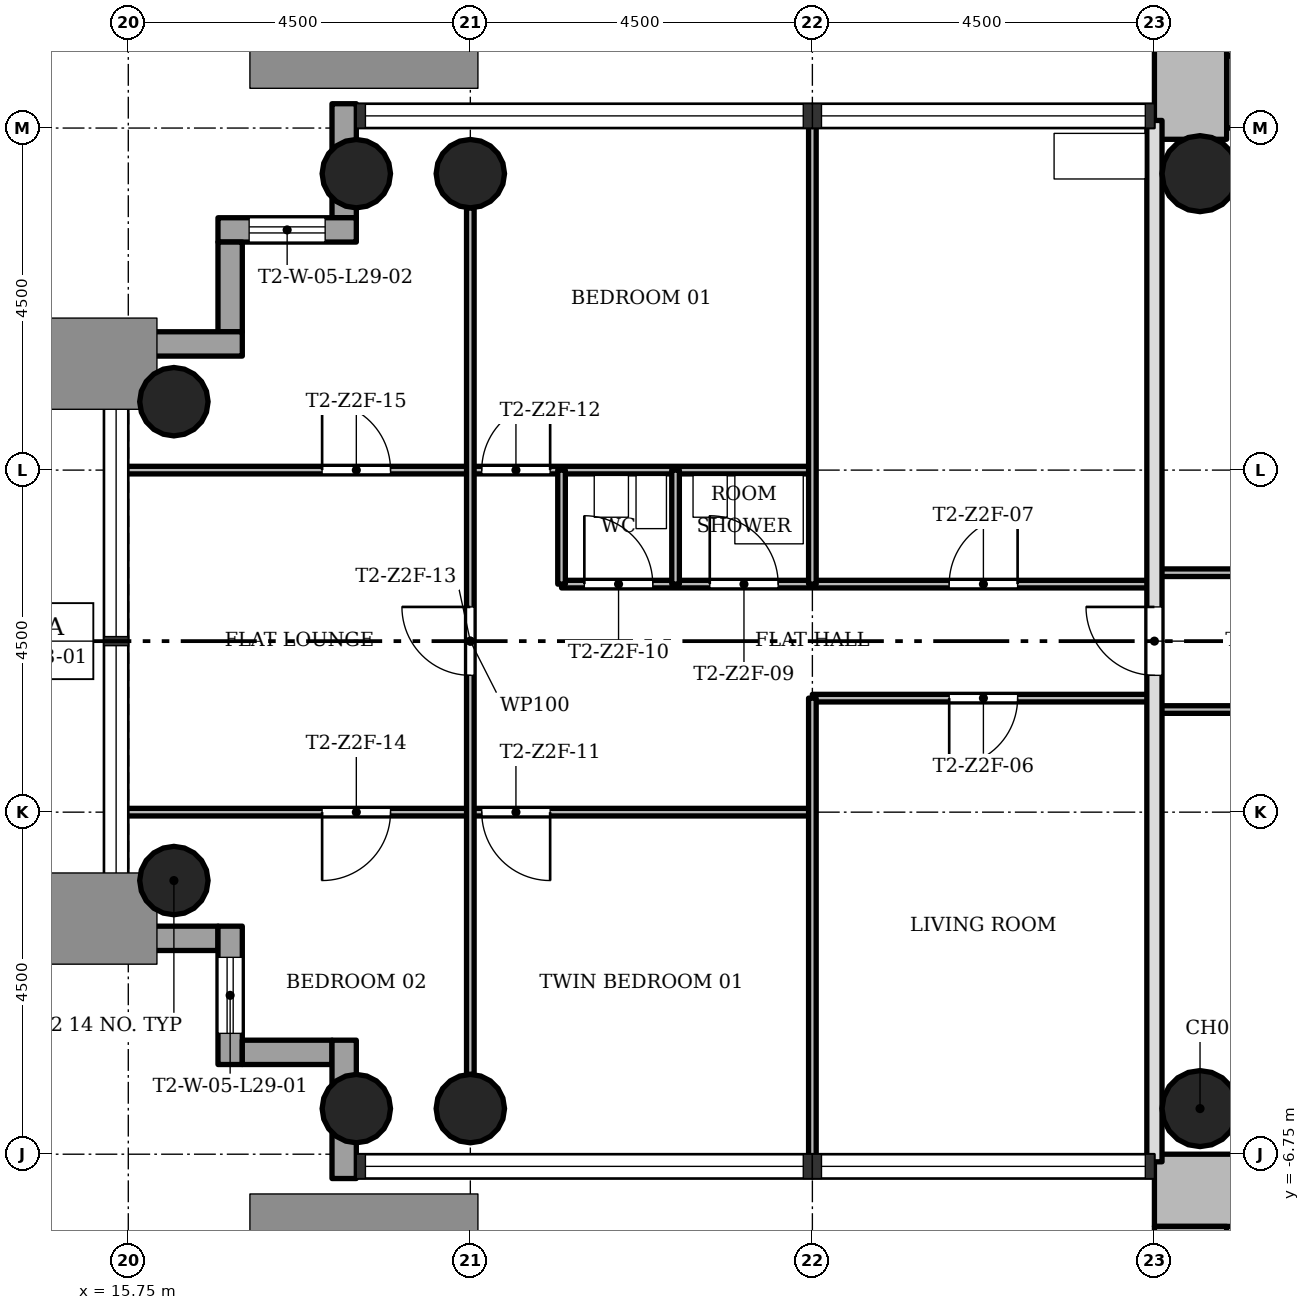
"""IFC4 building model, lengths in metres.
Left out: names, types, materials, properties, quantities, classifications, styles, units other than length and angle.
Written with IfcOpenShell. Run it as: python <this file> out.ifc"""

import sys

from ifc_helpers import new_model, si_unit, direction, frame, frame_2d, origin, origin_2d, place, context, subcontext, project, spatial, rectangle, hollow_circle, extrude, element, fill, save


model = new_model("IFC4")
c1 = context("Model", 3, precision=1e-05, world=origin(), true_north=direction((0.0, 1.0)))
c2 = subcontext(c1, "Body", "Model", "MODEL_VIEW")
j1 = project(units=[si_unit("LENGTHUNIT", "METRE"), si_unit("PLANEANGLEUNIT", "RADIAN")], contexts=[c1])
p1 = place(None, origin())
s1 = spatial("IfcSite", under=j1, at=p1, CompositionType="ELEMENT")
p2 = place(p1, origin())
s2 = spatial("IfcBuilding", under=s1, at=p2, CompositionType="ELEMENT")
p3 = place(p2, frame((0.0, 0.0, 107.2)))
s3 = spatial("IfcBuildingStorey", under=s2, at=p3, CompositionType="ELEMENT", Elevation=107.2)
p4 = place(p3, frame((30.2, 7.225, 0.0), z_axis=(0.0, 0.0, 1.0), x_axis=(1.0, 0.0, 0.0)))
e1 = element("IfcWall", 1, at=p4, inside=s3, PredefinedType="SHEAR", context=c2, shape_type="SweptSolid", body=[
    extrude(rectangle(XDim=12.55, YDim=0.95, at=frame_2d((6.275, 0.0))), origin(), (0.0, 0.0, 1.0), 3.4),
])
p5 = place(p4, frame((4.9, 0.0, 0.0)))
e2 = element("IfcOpeningElement", 2, at=p5, cuts=e1, PredefinedType="OPENING", context=c2, shape_type="SweptSolid", body=[
    extrude(rectangle(XDim=1.8, YDim=2.1, at=frame_2d((0.9, 1.05))), frame((0.0, 0.485, 0.0), z_axis=(0.0, -1.0, 0.0), x_axis=(1.0, 0.0, 0.0)), (0.0, 0.0, 1.0), 0.97),
])
p6 = place(p3, frame((29.725, 15.298, 0.0), z_axis=(0.0, 0.0, 1.0), x_axis=(0.0, -1.0, 0.0)))
e3 = element("IfcWall", 3, at=p6, inside=s3, PredefinedType="SHEAR", context=c2, shape_type="SweptSolid", body=[
    extrude(rectangle(XDim=8.696, YDim=0.95, at=frame_2d((4.348, 0.0))), origin(), (0.0, 0.0, 1.0), 3.4),
])
p7 = place(p3, frame((41.8, -7.225, 0.0), z_axis=(0.0, 0.0, 1.0), x_axis=(-1.0, 0.0, 0.0)))
e4 = element("IfcWall", 4, at=p7, inside=s3, PredefinedType="SHEAR", context=c2, shape_type="SweptSolid", body=[
    extrude(rectangle(XDim=12.55, YDim=0.95, at=frame_2d((6.275, 0.0))), origin(), (0.0, 0.0, 1.0), 3.4),
])
p8 = place(p7, frame((4.9, 0.0, 0.0)))
e5 = element("IfcOpeningElement", 5, at=p8, cuts=e4, PredefinedType="OPENING", context=c2, shape_type="SweptSolid", body=[
    extrude(rectangle(XDim=1.8, YDim=2.1, at=frame_2d((0.9, 1.05))), frame((0.0, 0.485, 0.0), z_axis=(0.0, -1.0, 0.0), x_axis=(1.0, 0.0, 0.0)), (0.0, 0.0, 1.0), 0.97),
])
p9 = place(p3, frame((29.725, -7.7, 0.0), z_axis=(0.0, 0.0, 1.0), x_axis=(0.0, -1.0, 0.0)))
e6 = element("IfcWall", 6, at=p9, inside=s3, PredefinedType="SHEAR", context=c2, shape_type="SweptSolid", body=[
    extrude(rectangle(XDim=8.05, YDim=0.95, at=frame_2d((4.025, 0.0))), origin(), (0.0, 0.0, 1.0), 3.4),
])
for number, where, z_axis, x_axis in (
    (7, (20.25, 6.15, 0.0), (0.0, 0.0, 1.0), (1.0, 0.0, 0.0)),
    (8, (20.25, -6.15, 0.0), (0.0, 0.0, 1.0), (1.0, 0.0, 0.0)),
    (9, (18.75, 6.15, 0.0), (0.0, 0.0, 1.0), (1.0, 0.0, 0.0)),
    (10, (18.75, -6.15, 0.0), (0.0, 0.0, 1.0), (1.0, 0.0, 0.0)),
    (11, (16.35, 3.15, 0.0), (0.0, 0.0, 1.0), (1.0, 0.0, 0.0)),
    (12, (16.35, -3.15, 0.0), (0.0, 0.0, 1.0), (1.0, 0.0, 0.0)),
):
    element("IfcColumn", number, at=place(p3, frame(where, z_axis=z_axis, x_axis=x_axis)), inside=s3, PredefinedType="COLUMN", context=c2, shape_type="SweptSolid", body=[
        extrude(hollow_circle(Radius=0.45, WallThickness=0.032, at=origin_2d()), origin(), (0.0, 0.0, 1.0), 3.4),
    ])
for number, where, z_axis, x_axis in (
    (13, (29.85, 6.15, 0.0), (0.0, 0.0, 1.0), (1.0, 0.0, 0.0)),
    (14, (29.85, -6.15, 0.0), (0.0, 0.0, 1.0), (1.0, 0.0, 0.0)),
):
    element("IfcColumn", number, at=place(p3, frame(where, z_axis=z_axis, x_axis=x_axis)), inside=s3, PredefinedType="COLUMN", context=c2, shape_type="SweptSolid", body=[
        extrude(hollow_circle(Radius=0.5, WallThickness=0.036, at=origin_2d()), origin(), (0.0, 0.0, 1.0), 3.4),
    ])
p10 = place(p3, frame((18.59, 7.07, -0.3), z_axis=(0.0, 0.0, 1.0), x_axis=(0.0, -1.0, 0.0)))
e15 = element("IfcWall", 15, at=p10, inside=s3, PredefinedType="STANDARD", context=c2, shape_type="SweptSolid", body=[
    extrude(rectangle(XDim=1.5, YDim=0.32, at=frame_2d((0.75, 0.0))), origin(), (0.0, 0.0, 1.0), 3.4),
])
p11 = place(p3, frame((18.75, 5.41, -0.3), z_axis=(0.0, 0.0, 1.0), x_axis=(-1.0, 0.0, 0.0)))
e16 = element("IfcWall", 16, at=p11, inside=s3, PredefinedType="STANDARD", context=c2, shape_type="SweptSolid", body=[
    extrude(rectangle(XDim=1.82, YDim=0.32, at=frame_2d((0.91, 0.0))), origin(), (0.0, 0.0, 1.0), 3.4),
])
p12 = place(p11, frame((0.41, 0.0, 1.2)))
e17 = element("IfcOpeningElement", 17, at=p12, cuts=e16, PredefinedType="OPENING", context=c2, shape_type="SweptSolid", body=[
    extrude(rectangle(XDim=1.0, YDim=1.5, at=frame_2d((0.5, 0.75))), frame((0.0, 0.17, 0.0), z_axis=(0.0, -1.0, 0.0), x_axis=(1.0, 0.0, 0.0)), (0.0, 0.0, 1.0), 0.34),
])
p13 = place(p3, frame((17.09, 5.25, -0.3), z_axis=(0.0, 0.0, 1.0), x_axis=(0.0, -1.0, 0.0)))
e18 = element("IfcWall", 18, at=p13, inside=s3, PredefinedType="STANDARD", context=c2, shape_type="SweptSolid", body=[
    extrude(rectangle(XDim=1.18, YDim=0.32, at=frame_2d((0.59, 0.0))), origin(), (0.0, 0.0, 1.0), 3.4),
])
p14 = place(p3, frame((17.25, 3.91, -0.3), z_axis=(0.0, 0.0, 1.0), x_axis=(-1.0, 0.0, 0.0)))
e19 = element("IfcWall", 19, at=p14, inside=s3, PredefinedType="STANDARD", context=c2, shape_type="SweptSolid", body=[
    extrude(rectangle(XDim=1.82, YDim=0.32, at=frame_2d((0.91, 0.0))), origin(), (0.0, 0.0, 1.0), 3.4),
])
p15 = place(p3, frame((15.43, -3.91, -0.3), z_axis=(0.0, 0.0, 1.0), x_axis=(1.0, 0.0, 0.0)))
e20 = element("IfcWall", 20, at=p15, inside=s3, PredefinedType="STANDARD", context=c2, shape_type="SweptSolid", body=[
    extrude(rectangle(XDim=1.5, YDim=0.32, at=frame_2d((0.75, 0.0))), origin(), (0.0, 0.0, 1.0), 3.4),
])
p16 = place(p3, frame((17.09, -3.75, -0.3), z_axis=(0.0, 0.0, 1.0), x_axis=(0.0, -1.0, 0.0)))
e21 = element("IfcWall", 21, at=p16, inside=s3, PredefinedType="STANDARD", context=c2, shape_type="SweptSolid", body=[
    extrude(rectangle(XDim=1.82, YDim=0.32, at=frame_2d((0.91, 0.0))), origin(), (0.0, 0.0, 1.0), 3.4),
])
p17 = place(p16, frame((0.41, 0.0, 1.2)))
e22 = element("IfcOpeningElement", 22, at=p17, cuts=e21, PredefinedType="OPENING", context=c2, shape_type="SweptSolid", body=[
    extrude(rectangle(XDim=1.0, YDim=1.5, at=frame_2d((0.5, 0.75))), frame((0.0, 0.17, 0.0), z_axis=(0.0, -1.0, 0.0), x_axis=(1.0, 0.0, 0.0)), (0.0, 0.0, 1.0), 0.34),
])
p18 = place(p3, frame((17.25, -5.41, -0.3), z_axis=(0.0, 0.0, 1.0), x_axis=(1.0, 0.0, 0.0)))
e23 = element("IfcWall", 23, at=p18, inside=s3, PredefinedType="STANDARD", context=c2, shape_type="SweptSolid", body=[
    extrude(rectangle(XDim=1.18, YDim=0.32, at=frame_2d((0.59, 0.0))), origin(), (0.0, 0.0, 1.0), 3.4),
])
p19 = place(p3, frame((18.59, -5.25, -0.3), z_axis=(0.0, 0.0, 1.0), x_axis=(0.0, -1.0, 0.0)))
e24 = element("IfcWall", 24, at=p19, inside=s3, PredefinedType="STANDARD", context=c2, shape_type="SweptSolid", body=[
    extrude(rectangle(XDim=1.82, YDim=0.32, at=frame_2d((0.91, 0.0))), origin(), (0.0, 0.0, 1.0), 3.4),
])
p20 = place(p3, frame((24.75, -2.25, 0.0), z_axis=(0.0, 0.0, 1.0), x_axis=(-1.0, 0.0, 0.0)))
e25 = element("IfcWall", 25, at=p20, inside=s3, PredefinedType="PARTITIONING", context=c2, shape_type="SweptSolid", body=[
    extrude(rectangle(XDim=9.1, YDim=0.1, at=frame_2d((4.55, 0.0))), origin(), (0.0, 0.0, 1.0), 3.0),
])
p21 = place(p20, frame((3.45, 0.0, 0.0)))
e26 = element("IfcOpeningElement", 26, at=p21, cuts=e25, PredefinedType="OPENING", context=c2, shape_type="SweptSolid", body=[
    extrude(rectangle(XDim=0.9, YDim=2.1, at=frame_2d((0.45, 1.05))), frame((0.0, 0.06, 0.0), z_axis=(0.0, -1.0, 0.0), x_axis=(1.0, 0.0, 0.0)), (0.0, 0.0, 1.0), 0.12),
])
p22 = place(p20, frame((5.55, 0.0, 0.0)))
e27 = element("IfcOpeningElement", 27, at=p22, cuts=e25, PredefinedType="OPENING", context=c2, shape_type="SweptSolid", body=[
    extrude(rectangle(XDim=0.9, YDim=2.1, at=frame_2d((0.45, 1.05))), frame((0.0, 0.06, 0.0), z_axis=(0.0, -1.0, 0.0), x_axis=(1.0, 0.0, 0.0)), (0.0, 0.0, 1.0), 0.12),
])
p23 = place(p3, frame((34.5, -0.9, 0.0), z_axis=(0.0, 0.0, 1.0), x_axis=(-1.0, 0.0, 0.0)))
e28 = element("IfcWall", 28, at=p23, inside=s3, PredefinedType="PARTITIONING", context=c2, shape_type="SweptSolid", body=[
    extrude(rectangle(XDim=5.25, YDim=0.1, at=frame_2d((2.625, 0.0))), origin(), (0.0, 0.0, 1.0), 3.0),
])
p24 = place(p3, frame((29.25, -0.75, 0.0), z_axis=(0.0, 0.0, 1.0), x_axis=(-1.0, 0.0, 0.0)))
e29 = element("IfcWall", 29, at=p24, inside=s3, PredefinedType="PARTITIONING", context=c2, shape_type="SweptSolid", body=[
    extrude(rectangle(XDim=4.5, YDim=0.1, at=frame_2d((2.25, 0.0))), origin(), (0.0, 0.0, 1.0), 3.0),
])
p25 = place(p24, frame((1.8, 0.0, 0.0)))
e30 = element("IfcOpeningElement", 30, at=p25, cuts=e29, PredefinedType="OPENING", context=c2, shape_type="SweptSolid", body=[
    extrude(rectangle(XDim=0.9, YDim=2.1, at=frame_2d((0.45, 1.05))), frame((0.0, 0.06, 0.0), z_axis=(0.0, -1.0, 0.0), x_axis=(1.0, 0.0, 0.0)), (0.0, 0.0, 1.0), 0.12),
])
p26 = place(p3, frame((29.25, 0.75, 0.0), z_axis=(0.0, 0.0, 1.0), x_axis=(-1.0, 0.0, 0.0)))
e31 = element("IfcWall", 31, at=p26, inside=s3, PredefinedType="PARTITIONING", context=c2, shape_type="SweptSolid", body=[
    extrude(rectangle(XDim=7.8, YDim=0.1, at=frame_2d((3.9, 0.0))), origin(), (0.0, 0.0, 1.0), 3.0),
])
p27 = place(p26, frame((1.8, 0.0, 0.0)))
e32 = element("IfcOpeningElement", 32, at=p27, cuts=e31, PredefinedType="OPENING", context=c2, shape_type="SweptSolid", body=[
    extrude(rectangle(XDim=0.9, YDim=2.1, at=frame_2d((0.45, 1.05))), frame((0.0, 0.06, 0.0), z_axis=(0.0, -1.0, 0.0), x_axis=(1.0, 0.0, 0.0)), (0.0, 0.0, 1.0), 0.12),
])
p28 = place(p26, frame((4.95, 0.0, 0.0)))
e33 = element("IfcOpeningElement", 33, at=p28, cuts=e31, PredefinedType="OPENING", context=c2, shape_type="SweptSolid", body=[
    extrude(rectangle(XDim=0.9, YDim=2.1, at=frame_2d((0.45, 1.05))), frame((0.0, 0.06, 0.0), z_axis=(0.0, -1.0, 0.0), x_axis=(1.0, 0.0, 0.0)), (0.0, 0.0, 1.0), 0.12),
])
p29 = place(p26, frame((6.6, 0.0, 0.0)))
e34 = element("IfcOpeningElement", 34, at=p29, cuts=e31, PredefinedType="OPENING", context=c2, shape_type="SweptSolid", body=[
    extrude(rectangle(XDim=0.9, YDim=2.1, at=frame_2d((0.45, 1.05))), frame((0.0, 0.06, 0.0), z_axis=(0.0, -1.0, 0.0), x_axis=(1.0, 0.0, 0.0)), (0.0, 0.0, 1.0), 0.12),
])
p30 = place(p3, frame((34.5, 0.9, 0.0), z_axis=(0.0, 0.0, 1.0), x_axis=(-1.0, 0.0, 0.0)))
e35 = element("IfcWall", 35, at=p30, inside=s3, PredefinedType="PARTITIONING", context=c2, shape_type="SweptSolid", body=[
    extrude(rectangle(XDim=5.25, YDim=0.1, at=frame_2d((2.625, 0.0))), origin(), (0.0, 0.0, 1.0), 3.0),
])
p31 = place(p30, frame((0.75, 0.0, 0.0)))
e36 = element("IfcOpeningElement", 36, at=p31, cuts=e35, PredefinedType="OPENING", context=c2, shape_type="SweptSolid", body=[
    extrude(rectangle(XDim=0.9, YDim=2.1, at=frame_2d((0.45, 1.05))), frame((0.0, 0.06, 0.0), z_axis=(0.0, -1.0, 0.0), x_axis=(1.0, 0.0, 0.0)), (0.0, 0.0, 1.0), 0.12),
])
p32 = place(p3, frame((24.75, 2.25, 0.0), z_axis=(0.0, 0.0, 1.0), x_axis=(-1.0, 0.0, 0.0)))
e37 = element("IfcWall", 37, at=p32, inside=s3, PredefinedType="PARTITIONING", context=c2, shape_type="SweptSolid", body=[
    extrude(rectangle(XDim=9.1, YDim=0.1, at=frame_2d((4.55, 0.0))), origin(), (0.0, 0.0, 1.0), 3.0),
])
p33 = place(p32, frame((3.45, 0.0, 0.0)))
e38 = element("IfcOpeningElement", 38, at=p33, cuts=e37, PredefinedType="OPENING", context=c2, shape_type="SweptSolid", body=[
    extrude(rectangle(XDim=0.9, YDim=2.1, at=frame_2d((0.45, 1.05))), frame((0.0, 0.06, 0.0), z_axis=(0.0, -1.0, 0.0), x_axis=(1.0, 0.0, 0.0)), (0.0, 0.0, 1.0), 0.12),
])
p34 = place(p32, frame((5.55, 0.0, 0.0)))
e39 = element("IfcOpeningElement", 39, at=p34, cuts=e37, PredefinedType="OPENING", context=c2, shape_type="SweptSolid", body=[
    extrude(rectangle(XDim=0.9, YDim=2.1, at=frame_2d((0.45, 1.05))), frame((0.0, 0.06, 0.0), z_axis=(0.0, -1.0, 0.0), x_axis=(1.0, 0.0, 0.0)), (0.0, 0.0, 1.0), 0.12),
])
p35 = place(p3, frame((29.25, -6.85, 0.0), z_axis=(0.0, 0.0, 1.0), x_axis=(0.0, 1.0, 0.0)))
e40 = element("IfcWall", 40, at=p35, inside=s3, PredefinedType="SOLIDWALL", context=c2, shape_type="SweptSolid", body=[
    extrude(rectangle(XDim=13.7, YDim=0.2, at=frame_2d((6.85, 0.0))), origin(), (0.0, 0.0, 1.0), 3.0),
])
p36 = place(p35, frame((6.4, 0.0, 0.0)))
e41 = element("IfcOpeningElement", 41, at=p36, cuts=e40, PredefinedType="OPENING", context=c2, shape_type="SweptSolid", body=[
    extrude(rectangle(XDim=0.9, YDim=2.1, at=frame_2d((0.45, 1.05))), frame((0.0, 0.11, 0.0), z_axis=(0.0, -1.0, 0.0), x_axis=(1.0, 0.0, 0.0)), (0.0, 0.0, 1.0), 0.22),
])
for number, where, z_axis, x_axis in (
    (42, (24.75, -6.85, 0.0), (0.0, 0.0, 1.0), (0.0, 1.0, 0.0)),
    (43, (24.75, 0.75, 0.0), (0.0, 0.0, 1.0), (0.0, 1.0, 0.0)),
):
    element("IfcWall", number, at=place(p3, frame(where, z_axis=z_axis, x_axis=x_axis)), inside=s3, PredefinedType="PARTITIONING", context=c2, shape_type="SweptSolid", body=[
        extrude(rectangle(XDim=6.1, YDim=0.1, at=frame_2d((3.05, 0.0))), origin(), (0.0, 0.0, 1.0), 3.0),
    ])
for number, where, z_axis, x_axis in (
    (44, (22.95, 0.75, 0.0), (0.0, 0.0, 1.0), (0.0, 1.0, 0.0)),
    (45, (21.45, 0.75, 0.0), (0.0, 0.0, 1.0), (0.0, 1.0, 0.0)),
):
    element("IfcWall", number, at=place(p3, frame(where, z_axis=z_axis, x_axis=x_axis)), inside=s3, PredefinedType="PARTITIONING", context=c2, shape_type="SweptSolid", body=[
        extrude(rectangle(XDim=1.5, YDim=0.1, at=frame_2d((0.75, 0.0))), origin(), (0.0, 0.0, 1.0), 3.0),
    ])
p37 = place(p3, frame((20.25, -5.7, 0.0), z_axis=(0.0, 0.0, 1.0), x_axis=(0.0, 1.0, 0.0)))
e46 = element("IfcWall", 46, at=p37, inside=s3, PredefinedType="PARTITIONING", context=c2, shape_type="SweptSolid", body=[
    extrude(rectangle(XDim=11.4, YDim=0.1, at=frame_2d((5.7, 0.0))), origin(), (0.0, 0.0, 1.0), 3.0),
])
p38 = place(p37, frame((5.25, 0.0, 0.0)))
e47 = element("IfcOpeningElement", 47, at=p38, cuts=e46, PredefinedType="OPENING", context=c2, shape_type="SweptSolid", body=[
    extrude(rectangle(XDim=0.9, YDim=2.1, at=frame_2d((0.45, 1.05))), frame((0.0, 0.06, 0.0), z_axis=(0.0, -1.0, 0.0), x_axis=(1.0, 0.0, 0.0)), (0.0, 0.0, 1.0), 0.12),
])
p39 = place(p3, frame((34.1, 7.825, 0.0), z_axis=(0.0, 0.0, 1.0), x_axis=(-1.0, 0.0, 0.0)))
e48 = element("IfcWall", 48, at=p39, inside=s3, PredefinedType="SHEAR", context=c2, shape_type="SweptSolid", body=[
    extrude(rectangle(XDim=3.9, YDim=0.25, at=frame_2d((1.95, 0.0))), origin(), (0.0, 0.0, 1.0), 3.4),
])
p40 = place(p25, origin())
e49 = element("IfcDoor", 49, at=p40, inside=s3, OperationType="SINGLE_SWING_LEFT", PredefinedType="DOOR", context=c2, shape_type="SweptSolid", body=[
    extrude(rectangle(XDim=0.9, YDim=2.1, at=frame_2d((0.45, 1.05))), frame((0.0, 0.025, 0.0), z_axis=(0.0, -1.0, 0.0), x_axis=(1.0, 0.0, 0.0)), (0.0, 0.0, 1.0), 0.05),
])
fill(e30, e49)
p41 = place(p27, origin())
e50 = element("IfcDoor", 50, at=p41, inside=s3, OperationType="SINGLE_SWING_LEFT", PredefinedType="DOOR", context=c2, shape_type="SweptSolid", body=[
    extrude(rectangle(XDim=0.9, YDim=2.1, at=frame_2d((0.45, 1.05))), frame((0.0, 0.025, 0.0), z_axis=(0.0, -1.0, 0.0), x_axis=(1.0, 0.0, 0.0)), (0.0, 0.0, 1.0), 0.05),
])
fill(e32, e50)
p42 = place(p36, origin())
e51 = element("IfcDoor", 51, at=p42, inside=s3, OperationType="SINGLE_SWING_LEFT", PredefinedType="DOOR", context=c2, shape_type="SweptSolid", body=[
    extrude(rectangle(XDim=0.9, YDim=2.1, at=frame_2d((0.45, 1.05))), frame((0.0, 0.025, 0.0), z_axis=(0.0, -1.0, 0.0), x_axis=(1.0, 0.0, 0.0)), (0.0, 0.0, 1.0), 0.05),
])
fill(e41, e51)
p43 = place(p28, origin())
e52 = element("IfcDoor", 52, at=p43, inside=s3, OperationType="SINGLE_SWING_RIGHT", PredefinedType="DOOR", context=c2, shape_type="SweptSolid", body=[
    extrude(rectangle(XDim=0.9, YDim=2.1, at=frame_2d((0.45, 1.05))), frame((0.0, 0.025, 0.0), z_axis=(0.0, -1.0, 0.0), x_axis=(1.0, 0.0, 0.0)), (0.0, 0.0, 1.0), 0.05),
])
fill(e33, e52)
p44 = place(p29, origin())
e53 = element("IfcDoor", 53, at=p44, inside=s3, OperationType="SINGLE_SWING_RIGHT", PredefinedType="DOOR", context=c2, shape_type="SweptSolid", body=[
    extrude(rectangle(XDim=0.9, YDim=2.1, at=frame_2d((0.45, 1.05))), frame((0.0, 0.025, 0.0), z_axis=(0.0, -1.0, 0.0), x_axis=(1.0, 0.0, 0.0)), (0.0, 0.0, 1.0), 0.05),
])
fill(e34, e53)
p45 = place(p21, origin())
e54 = element("IfcDoor", 54, at=p45, inside=s3, OperationType="SINGLE_SWING_RIGHT", PredefinedType="DOOR", context=c2, shape_type="SweptSolid", body=[
    extrude(rectangle(XDim=0.9, YDim=2.1, at=frame_2d((0.45, 1.05))), frame((0.0, 0.025, 0.0), z_axis=(0.0, -1.0, 0.0), x_axis=(1.0, 0.0, 0.0)), (0.0, 0.0, 1.0), 0.05),
])
fill(e26, e54)
p46 = place(p33, origin())
e55 = element("IfcDoor", 55, at=p46, inside=s3, OperationType="SINGLE_SWING_LEFT", PredefinedType="DOOR", context=c2, shape_type="SweptSolid", body=[
    extrude(rectangle(XDim=0.9, YDim=2.1, at=frame_2d((0.45, 1.05))), frame((0.0, 0.025, 0.0), z_axis=(0.0, -1.0, 0.0), x_axis=(1.0, 0.0, 0.0)), (0.0, 0.0, 1.0), 0.05),
])
fill(e38, e55)
p47 = place(p38, origin())
e56 = element("IfcDoor", 56, at=p47, inside=s3, OperationType="SINGLE_SWING_LEFT", PredefinedType="DOOR", context=c2, shape_type="SweptSolid", body=[
    extrude(rectangle(XDim=0.9, YDim=2.1, at=frame_2d((0.45, 1.05))), frame((0.0, 0.025, 0.0), z_axis=(0.0, -1.0, 0.0), x_axis=(1.0, 0.0, 0.0)), (0.0, 0.0, 1.0), 0.05),
])
fill(e47, e56)
p48 = place(p22, origin())
e57 = element("IfcDoor", 57, at=p48, inside=s3, OperationType="SINGLE_SWING_LEFT", PredefinedType="DOOR", context=c2, shape_type="SweptSolid", body=[
    extrude(rectangle(XDim=0.9, YDim=2.1, at=frame_2d((0.45, 1.05))), frame((0.0, 0.025, 0.0), z_axis=(0.0, -1.0, 0.0), x_axis=(1.0, 0.0, 0.0)), (0.0, 0.0, 1.0), 0.05),
])
fill(e27, e57)
p49 = place(p34, origin())
e58 = element("IfcDoor", 58, at=p49, inside=s3, OperationType="SINGLE_SWING_RIGHT", PredefinedType="DOOR", context=c2, shape_type="SweptSolid", body=[
    extrude(rectangle(XDim=0.9, YDim=2.1, at=frame_2d((0.45, 1.05))), frame((0.0, 0.025, 0.0), z_axis=(0.0, -1.0, 0.0), x_axis=(1.0, 0.0, 0.0)), (0.0, 0.0, 1.0), 0.05),
])
fill(e39, e58)
p50 = place(p17, origin())
e59 = element("IfcWindow", 59, at=p50, inside=s3, PartitioningType="SINGLE_PANEL", PredefinedType="WINDOW", context=c2, shape_type="SweptSolid", body=[
    extrude(rectangle(XDim=1.0, YDim=1.5, at=frame_2d((0.5, 0.75))), frame((0.0, 0.03, 0.0), z_axis=(0.0, -1.0, 0.0), x_axis=(1.0, 0.0, 0.0)), (0.0, 0.0, 1.0), 0.06),
])
fill(e22, e59)
p51 = place(p12, origin())
e60 = element("IfcWindow", 60, at=p51, inside=s3, PartitioningType="SINGLE_PANEL", PredefinedType="WINDOW", context=c2, shape_type="SweptSolid", body=[
    extrude(rectangle(XDim=1.0, YDim=1.5, at=frame_2d((0.5, 0.75))), frame((0.0, 0.03, 0.0), z_axis=(0.0, -1.0, 0.0), x_axis=(1.0, 0.0, 0.0)), (0.0, 0.0, 1.0), 0.06),
])
fill(e17, e60)
save(model, sys.argv[1])
